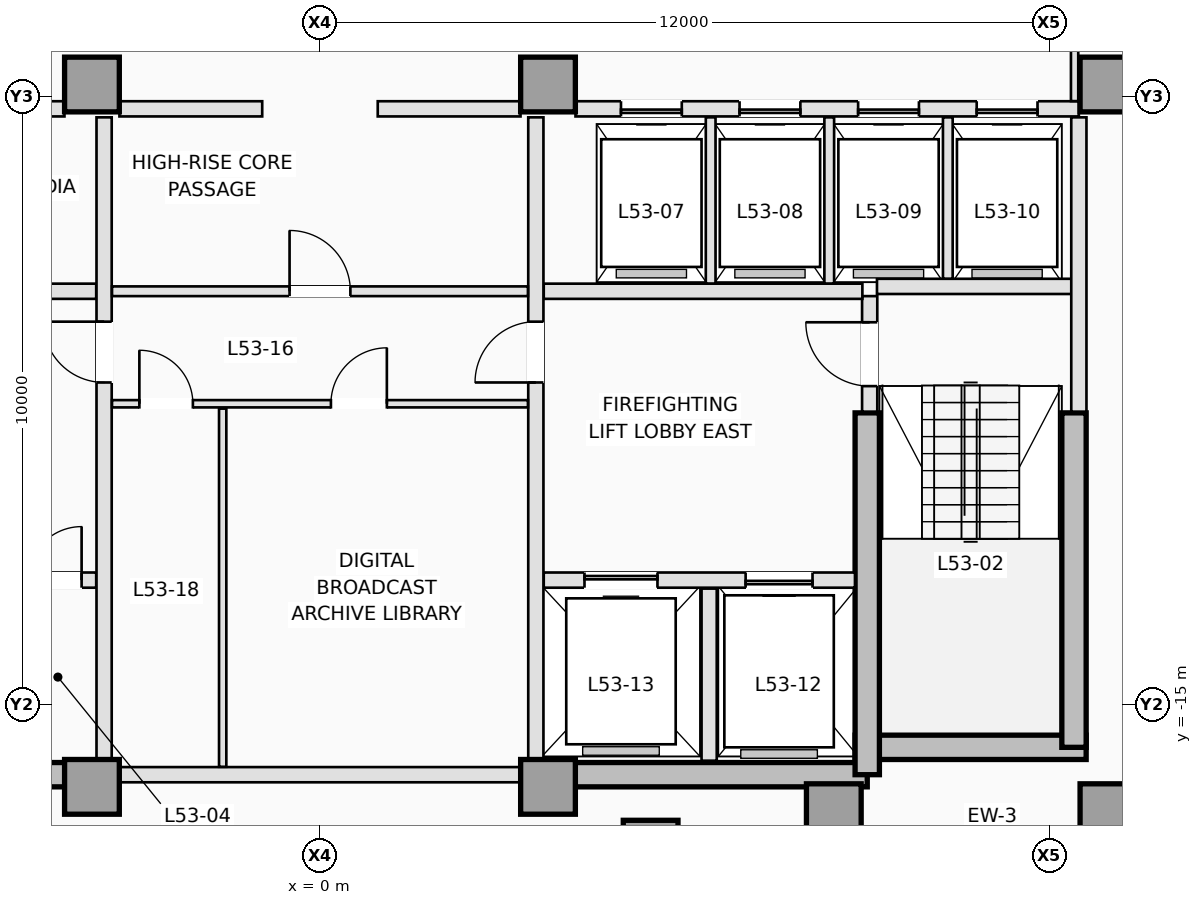
"""IFC4 building model, lengths in metres.
Left out: names, types, materials, properties, quantities, classifications, styles, units other than length and angle.
Written with IfcOpenShell. Run it as: python <this file> out.ifc"""

import sys

from ifc_helpers import new_model, si_unit, direction, frame, frame_2d, origin, origin_2d, place, context, subcontext, project, spatial, rectangle, extrude, element, fill, save


model = new_model("IFC4")
c1 = context("Model", 3, precision=1e-05, world=origin(), true_north=direction((0.0, 1.0)))
c2 = subcontext(c1, "Body", "Model", "MODEL_VIEW")
j1 = project(units=[si_unit("LENGTHUNIT", "METRE"), si_unit("PLANEANGLEUNIT", "RADIAN")], contexts=[c1])
p1 = place(None, origin())
s1 = spatial("IfcSite", under=j1, at=p1, CompositionType="ELEMENT")
p2 = place(p1, origin())
s2 = spatial("IfcBuilding", under=s1, at=p2, CompositionType="ELEMENT")
p3 = place(p2, frame((0.0, 0.0, 193.9)))
s3 = spatial("IfcBuildingStorey", under=s2, at=p3, CompositionType="ELEMENT", Elevation=193.9)
for number, where, z_axis, x_axis in (
    (1, (-9.0, -16.15, 0.0), (0.0, 0.0, 1.0), (1.0, 0.0, 0.0)),
    (2, (3.75, -16.15, 0.0), (0.0, 0.0, 1.0), (1.0, 0.0, 0.0)),
):
    element("IfcWall", number, at=place(p3, frame(where, z_axis=z_axis, x_axis=x_axis)), inside=s3, PredefinedType="SHEAR", context=c2, shape_type="SweptSolid", body=[
        extrude(rectangle(XDim=5.25, YDim=0.4, at=frame_2d((2.625, 0.0))), origin(), (0.0, 0.0, 1.0), 3.5),
    ])
p4 = place(p3, frame((8.8, -15.7, 0.0), z_axis=(0.0, 0.0, 1.0), x_axis=(1.0, 0.0, 0.0)))
e3 = element("IfcWall", 3, at=p4, inside=s3, PredefinedType="SHEAR", context=c2, shape_type="SweptSolid", body=[
    extrude(rectangle(XDim=3.8, YDim=0.4, at=frame_2d((1.9, 0.0))), origin(), (0.0, 0.0, 1.0), 3.5),
])
p5 = place(p3, frame((12.4, -15.7, 0.0), z_axis=(0.0, 0.0, 1.0), x_axis=(0.0, 1.0, 0.0)))
e4 = element("IfcWall", 4, at=p5, inside=s3, PredefinedType="SHEAR", context=c2, shape_type="SweptSolid", body=[
    extrude(rectangle(XDim=5.5, YDim=0.4, at=frame_2d((2.75, 0.0))), origin(), (0.0, 0.0, 1.0), 3.5),
])
p6 = place(p3, frame((9.0, -16.15, 0.0), z_axis=(0.0, 0.0, 1.0), x_axis=(0.0, 1.0, 0.0)))
e5 = element("IfcWall", 5, at=p6, inside=s3, PredefinedType="SHEAR", context=c2, shape_type="SweptSolid", body=[
    extrude(rectangle(XDim=5.95, YDim=0.4, at=frame_2d((2.975, 0.0))), origin(), (0.0, 0.0, 1.0), 3.5),
])
for number, where, z_axis, x_axis in (
    (6, (-3.75, -16.35, 0.0), (0.0, 0.0, 1.0), (1.0, 0.0, 0.0)),
    (7, (3.75, -16.35, 0.0), (0.0, 0.0, 1.0), (1.0, 0.0, 0.0)),
    (8, (8.45, -16.75, 0.0), (0.0, 0.0, 1.0), (1.0, 0.0, 0.0)),
    (9, (12.95, -16.75, 0.0), (0.0, 0.0, 1.0), (1.0, 0.0, 0.0)),
    (10, (-3.75, -4.8, 0.0), (0.0, 0.0, 1.0), (1.0, 0.0, 0.0)),
    (11, (3.75, -4.8, 0.0), (0.0, 0.0, 1.0), (1.0, 0.0, 0.0)),
    (12, (12.95, -4.8, 0.0), (0.0, 0.0, 1.0), (1.0, 0.0, 0.0)),
    (13, (5.438, -17.35, 0.0), (0.0, 0.0, 1.0), (0.0, 1.0, 0.0)),
):
    element("IfcColumn", number, at=place(p3, frame(where, z_axis=z_axis, x_axis=x_axis)), inside=s3, PredefinedType="COLUMN", context=c2, shape_type="SweptSolid", body=[
        extrude(rectangle(XDim=0.9, YDim=0.9, at=origin_2d()), origin(), (0.0, 0.0, 1.0), 3.5),
    ])
p7 = place(p3, frame((9.04, -10.18, 0.0), z_axis=(0.0, 0.0, 1.0), x_axis=(0.0, 1.0, 0.0)))
e14 = element("IfcWall", 14, at=p7, inside=s3, PredefinedType="PARTITIONING", context=c2, shape_type="SweptSolid", body=[
    extrude(rectangle(XDim=1.9, YDim=0.25, at=frame_2d((0.95, 0.0))), origin(), (0.0, 0.0, 1.0), 3.25),
])
p8 = place(p7, frame((0.42, 0.0, 0.0)))
e15 = element("IfcOpeningElement", 15, at=p8, cuts=e14, PredefinedType="OPENING", context=c2, shape_type="SweptSolid", body=[
    extrude(rectangle(XDim=1.05, YDim=2.15, at=frame_2d((0.525, 1.075))), frame((0.0, 0.135, 0.0), z_axis=(0.0, -1.0, 0.0), x_axis=(1.0, 0.0, 0.0)), (0.0, 0.0, 1.0), 0.27),
])
p9 = place(p3, frame((9.16, -8.12, 0.0), z_axis=(0.0, 0.0, 1.0), x_axis=(1.0, 0.0, 0.0)))
e16 = element("IfcWall", 16, at=p9, inside=s3, PredefinedType="PARTITIONING", context=c2, shape_type="SweptSolid", body=[
    extrude(rectangle(XDim=3.22, YDim=0.25, at=frame_2d((1.61, 0.0))), origin(), (0.0, 0.0, 1.0), 3.25),
])
p10 = place(p3, frame((12.48, -10.18, 0.0), z_axis=(0.0, 0.0, 1.0), x_axis=(0.0, 1.0, 0.0)))
e17 = element("IfcWall", 17, at=p10, inside=s3, PredefinedType="PARTITIONING", context=c2, shape_type="SweptSolid", body=[
    extrude(rectangle(XDim=4.84, YDim=0.25, at=frame_2d((2.42, 0.0))), origin(), (0.0, 0.0, 1.0), 3.25),
])
p11 = place(p3, frame((-8.798, -12.95, 0.0), z_axis=(0.0, 0.0, 1.0), x_axis=(1.0, 0.0, 0.0)))
e18 = element("IfcWall", 18, at=p11, inside=s3, PredefinedType="PARTITIONING", context=c2, shape_type="SweptSolid", body=[
    extrude(rectangle(XDim=5.118, YDim=0.25, at=frame_2d((2.559, 0.0))), origin(), (0.0, 0.0, 1.0), 3.25),
])
p12 = place(p11, frame((0.698, 0.0, 0.0)))
e19 = element("IfcOpeningElement", 19, at=p12, cuts=e18, PredefinedType="OPENING", context=c2, shape_type="SweptSolid", body=[
    extrude(rectangle(XDim=1.1, YDim=2.15, at=frame_2d((0.55, 1.075))), frame((0.0, 0.135, 0.0), z_axis=(0.0, -1.0, 0.0), x_axis=(1.0, 0.0, 0.0)), (0.0, 0.0, 1.0), 0.27),
])
p13 = place(p11, frame((2.598, 0.0, 0.0)))
e20 = element("IfcOpeningElement", 20, at=p13, cuts=e18, PredefinedType="OPENING", context=c2, shape_type="SweptSolid", body=[
    extrude(rectangle(XDim=0.88, YDim=2.1, at=frame_2d((0.44, 1.05))), frame((0.0, 0.135, 0.0), z_axis=(0.0, -1.0, 0.0), x_axis=(1.0, 0.0, 0.0)), (0.0, 0.0, 1.0), 0.27),
])
p14 = place(p11, frame((3.998, 0.0, 0.0)))
e21 = element("IfcOpeningElement", 21, at=p14, cuts=e18, PredefinedType="OPENING", context=c2, shape_type="SweptSolid", body=[
    extrude(rectangle(XDim=0.88, YDim=2.1, at=frame_2d((0.44, 1.05))), frame((0.0, 0.135, 0.0), z_axis=(0.0, -1.0, 0.0), x_axis=(1.0, 0.0, 0.0)), (0.0, 0.0, 1.0), 0.27),
])
p15 = place(p3, frame((3.68, -12.95, 0.0), z_axis=(0.0, 0.0, 1.0), x_axis=(1.0, 0.0, 0.0)))
e22 = element("IfcWall", 22, at=p15, inside=s3, PredefinedType="PARTITIONING", context=c2, shape_type="SweptSolid", body=[
    extrude(rectangle(XDim=5.118, YDim=0.25, at=frame_2d((2.559, 0.0))), origin(), (0.0, 0.0, 1.0), 3.25),
])
p16 = place(p15, frame((3.32, 0.0, 0.0)))
e23 = element("IfcOpeningElement", 23, at=p16, cuts=e22, PredefinedType="OPENING", context=c2, shape_type="SweptSolid", body=[
    extrude(rectangle(XDim=1.1, YDim=2.15, at=frame_2d((0.55, 1.075))), frame((0.0, 0.135, 0.0), z_axis=(0.0, -1.0, 0.0), x_axis=(1.0, 0.0, 0.0)), (0.0, 0.0, 1.0), 0.27),
])
p17 = place(p15, frame((0.67, 0.0, 0.0)))
e24 = element("IfcOpeningElement", 24, at=p17, cuts=e22, PredefinedType="OPENING", context=c2, shape_type="SweptSolid", body=[
    extrude(rectangle(XDim=1.2, YDim=2.15, at=frame_2d((0.6, 1.075))), frame((0.0, 0.135, 0.0), z_axis=(0.0, -1.0, 0.0), x_axis=(1.0, 0.0, 0.0)), (0.0, 0.0, 1.0), 0.27),
])
p18 = place(p3, frame((6.4, -15.92, 0.0), z_axis=(0.0, 0.0, 1.0), x_axis=(0.0, 1.0, 0.0)))
e25 = element("IfcWall", 25, at=p18, inside=s3, PredefinedType="PARTITIONING", context=c2, shape_type="SweptSolid", body=[
    extrude(rectangle(XDim=2.83, YDim=0.25, at=frame_2d((1.415, 0.0))), origin(), (0.0, 0.0, 1.0), 3.25),
])
for number, where, z_axis, x_axis in (
    (26, (-8.92, -8.2, 0.0), (0.0, 0.0, 1.0), (1.0, 0.0, 0.0)),
    (27, (3.68, -8.2, 0.0), (0.0, 0.0, 1.0), (1.0, 0.0, 0.0)),
):
    element("IfcWall", number, at=place(p3, frame(where, z_axis=z_axis, x_axis=x_axis)), inside=s3, PredefinedType="PARTITIONING", context=c2, shape_type="SweptSolid", body=[
        extrude(rectangle(XDim=5.24, YDim=0.25, at=frame_2d((2.62, 0.0))), origin(), (0.0, 0.0, 1.0), 3.25),
    ])
p19 = place(p3, frame((-3.55, -15.898, 0.0), z_axis=(0.0, 0.0, 1.0), x_axis=(0.0, 1.0, 0.0)))
e28 = element("IfcWall", 28, at=p19, inside=s3, PredefinedType="PARTITIONING", context=c2, shape_type="SweptSolid", body=[
    extrude(rectangle(XDim=10.558, YDim=0.25, at=frame_2d((5.279, 0.0))), origin(), (0.0, 0.0, 1.0), 3.25),
])
p20 = place(p19, frame((6.198, 0.0, 0.0)))
e29 = element("IfcOpeningElement", 29, at=p20, cuts=e28, PredefinedType="OPENING", context=c2, shape_type="SweptSolid", body=[
    extrude(rectangle(XDim=1.0, YDim=2.15, at=frame_2d((0.5, 1.075))), frame((0.0, 0.135, 0.0), z_axis=(0.0, -1.0, 0.0), x_axis=(1.0, 0.0, 0.0)), (0.0, 0.0, 1.0), 0.27),
])
p21 = place(p3, frame((3.55, -15.898, 0.0), z_axis=(0.0, 0.0, 1.0), x_axis=(0.0, 1.0, 0.0)))
e30 = element("IfcWall", 30, at=p21, inside=s3, PredefinedType="PARTITIONING", context=c2, shape_type="SweptSolid", body=[
    extrude(rectangle(XDim=10.558, YDim=0.25, at=frame_2d((5.279, 0.0))), origin(), (0.0, 0.0, 1.0), 3.25),
])
p22 = place(p21, frame((6.198, 0.0, 0.0)))
e31 = element("IfcOpeningElement", 31, at=p22, cuts=e30, PredefinedType="OPENING", context=c2, shape_type="SweptSolid", body=[
    extrude(rectangle(XDim=1.0, YDim=2.15, at=frame_2d((0.5, 1.075))), frame((0.0, 0.135, 0.0), z_axis=(0.0, -1.0, 0.0), x_axis=(1.0, 0.0, 0.0)), (0.0, 0.0, 1.0), 0.27),
])
p23 = place(p3, frame((-12.48, -5.2, 0.0), z_axis=(0.0, 0.0, 1.0), x_axis=(1.0, 0.0, 0.0)))
e32 = element("IfcWall", 32, at=p23, inside=s3, PredefinedType="PARTITIONING", context=c2, shape_type="SweptSolid", body=[
    extrude(rectangle(XDim=8.278, YDim=0.25, at=frame_2d((4.139, 0.0))), origin(), (0.0, 0.0, 1.0), 3.25),
])
p24 = place(p23, frame((3.05, 0.0, 0.0)))
e33 = element("IfcOpeningElement", 33, at=p24, cuts=e32, PredefinedType="OPENING", context=c2, shape_type="SweptSolid", body=[
    extrude(rectangle(XDim=0.92, YDim=2.12, at=frame_2d((0.46, 1.06))), frame((0.0, 0.135, 0.0), z_axis=(0.0, -1.0, 0.0), x_axis=(1.0, 0.0, 0.0)), (0.0, 0.0, 1.0), 0.27),
])
p25 = place(p23, frame((6.15, 0.0, 0.0)))
e34 = element("IfcOpeningElement", 34, at=p25, cuts=e32, PredefinedType="OPENING", context=c2, shape_type="SweptSolid", body=[
    extrude(rectangle(XDim=0.92, YDim=2.12, at=frame_2d((0.46, 1.06))), frame((0.0, 0.135, 0.0), z_axis=(0.0, -1.0, 0.0), x_axis=(1.0, 0.0, 0.0)), (0.0, 0.0, 1.0), 0.27),
])
p26 = place(p3, frame((4.202, -5.2, 0.0), z_axis=(0.0, 0.0, 1.0), x_axis=(1.0, 0.0, 0.0)))
e35 = element("IfcWall", 35, at=p26, inside=s3, PredefinedType="PARTITIONING", context=c2, shape_type="SweptSolid", body=[
    extrude(rectangle(XDim=8.278, YDim=0.25, at=frame_2d((4.139, 0.0))), origin(), (0.0, 0.0, 1.0), 3.25),
])
p27 = place(p26, frame((0.748, 0.0, 0.0)))
e36 = element("IfcOpeningElement", 36, at=p27, cuts=e35, PredefinedType="OPENING", context=c2, shape_type="SweptSolid", body=[
    extrude(rectangle(XDim=1.0, YDim=2.15, at=frame_2d((0.5, 1.075))), frame((0.0, 0.135, 0.0), z_axis=(0.0, -1.0, 0.0), x_axis=(1.0, 0.0, 0.0)), (0.0, 0.0, 1.0), 0.27),
])
p28 = place(p26, frame((2.698, 0.0, 0.0)))
e37 = element("IfcOpeningElement", 37, at=p28, cuts=e35, PredefinedType="OPENING", context=c2, shape_type="SweptSolid", body=[
    extrude(rectangle(XDim=1.0, YDim=2.15, at=frame_2d((0.5, 1.075))), frame((0.0, 0.135, 0.0), z_axis=(0.0, -1.0, 0.0), x_axis=(1.0, 0.0, 0.0)), (0.0, 0.0, 1.0), 0.27),
])
p29 = place(p26, frame((4.648, 0.0, 0.0)))
e38 = element("IfcOpeningElement", 38, at=p29, cuts=e35, PredefinedType="OPENING", context=c2, shape_type="SweptSolid", body=[
    extrude(rectangle(XDim=1.0, YDim=2.15, at=frame_2d((0.5, 1.075))), frame((0.0, 0.135, 0.0), z_axis=(0.0, -1.0, 0.0), x_axis=(1.0, 0.0, 0.0)), (0.0, 0.0, 1.0), 0.27),
])
p30 = place(p26, frame((6.598, 0.0, 0.0)))
e39 = element("IfcOpeningElement", 39, at=p30, cuts=e35, PredefinedType="OPENING", context=c2, shape_type="SweptSolid", body=[
    extrude(rectangle(XDim=1.0, YDim=2.15, at=frame_2d((0.5, 1.075))), frame((0.0, 0.135, 0.0), z_axis=(0.0, -1.0, 0.0), x_axis=(1.0, 0.0, 0.0)), (0.0, 0.0, 1.0), 0.27),
])
for number, where, z_axis, x_axis in (
    (40, (-3.298, -5.2, 0.0), (0.0, 0.0, 1.0), (1.0, 0.0, 0.0)),
    (41, (0.95, -5.2, 0.0), (0.0, 0.0, 1.0), (1.0, 0.0, 0.0)),
):
    element("IfcWall", number, at=place(p3, frame(where, z_axis=z_axis, x_axis=x_axis)), inside=s3, PredefinedType="PARTITIONING", context=c2, shape_type="SweptSolid", body=[
        extrude(rectangle(XDim=2.348, YDim=0.25, at=frame_2d((1.174, 0.0))), origin(), (0.0, 0.0, 1.0), 3.25),
    ])
for number, where, z_axis, x_axis in (
    (42, (6.425, -8.073, 0.0), (0.0, 0.0, 1.0), (0.0, 1.0, 0.0)),
    (43, (8.375, -8.073, 0.0), (0.0, 0.0, 1.0), (0.0, 1.0, 0.0)),
):
    element("IfcWall", number, at=place(p3, frame(where, z_axis=z_axis, x_axis=x_axis)), inside=s3, PredefinedType="PARTITIONING", context=c2, shape_type="SweptSolid", body=[
        extrude(rectangle(XDim=2.733, YDim=0.16, at=frame_2d((1.366, 0.0))), origin(), (0.0, 0.0, 1.0), 3.25),
    ])
p31 = place(p3, frame((10.325, -7.993, 0.0), z_axis=(0.0, 0.0, 1.0), x_axis=(0.0, 1.0, 0.0)))
e44 = element("IfcWall", 44, at=p31, inside=s3, PredefinedType="PARTITIONING", context=c2, shape_type="SweptSolid", body=[
    extrude(rectangle(XDim=2.653, YDim=0.16, at=frame_2d((1.326, 0.0))), origin(), (0.0, 0.0, 1.0), 3.25),
])
p32 = place(p3, frame((-3.298, -16.15, 0.0), z_axis=(0.0, 0.0, 1.0), x_axis=(1.0, 0.0, 0.0)))
e45 = element("IfcWall", 45, at=p32, inside=s3, PredefinedType="PARTITIONING", context=c2, shape_type="SweptSolid", body=[
    extrude(rectangle(XDim=6.596, YDim=0.25, at=frame_2d((3.298, 0.0))), origin(), (0.0, 0.0, 1.0), 2.45),
])
p33 = place(p3, frame((-3.42, -8.2, 0.0), z_axis=(0.0, 0.0, 1.0), x_axis=(1.0, 0.0, 0.0)))
e46 = element("IfcWall", 46, at=p33, inside=s3, PredefinedType="PARTITIONING", context=c2, shape_type="SweptSolid", body=[
    extrude(rectangle(XDim=6.84, YDim=0.16, at=frame_2d((3.42, 0.0))), origin(), (0.0, 0.0, 1.0), 3.25),
])
p34 = place(p33, frame((2.92, 0.0, 0.0)))
e47 = element("IfcOpeningElement", 47, at=p34, cuts=e46, PredefinedType="OPENING", context=c2, shape_type="SweptSolid", body=[
    extrude(rectangle(XDim=1.0, YDim=2.15, at=frame_2d((0.5, 1.075))), frame((0.0, 0.09, 0.0), z_axis=(0.0, -1.0, 0.0), x_axis=(1.0, 0.0, 0.0)), (0.0, 0.0, 1.0), 0.18),
])
p35 = place(p3, frame((-3.42, -10.05, 0.0), z_axis=(0.0, 0.0, 1.0), x_axis=(1.0, 0.0, 0.0)))
e48 = element("IfcWall", 48, at=p35, inside=s3, PredefinedType="PARTITIONING", context=c2, shape_type="SweptSolid", body=[
    extrude(rectangle(XDim=6.84, YDim=0.12, at=frame_2d((3.42, 0.0))), origin(), (0.0, 0.0, 1.0), 3.25),
])
p36 = place(p35, frame((0.45, 0.0, 0.0)))
e49 = element("IfcOpeningElement", 49, at=p36, cuts=e48, PredefinedType="OPENING", context=c2, shape_type="SweptSolid", body=[
    extrude(rectangle(XDim=0.88, YDim=2.12, at=frame_2d((0.44, 1.06))), frame((0.0, 0.07, 0.0), z_axis=(0.0, -1.0, 0.0), x_axis=(1.0, 0.0, 0.0)), (0.0, 0.0, 1.0), 0.14),
])
p37 = place(p35, frame((3.6, 0.0, 0.0)))
e50 = element("IfcOpeningElement", 50, at=p37, cuts=e48, PredefinedType="OPENING", context=c2, shape_type="SweptSolid", body=[
    extrude(rectangle(XDim=0.92, YDim=2.12, at=frame_2d((0.46, 1.06))), frame((0.0, 0.07, 0.0), z_axis=(0.0, -1.0, 0.0), x_axis=(1.0, 0.0, 0.0)), (0.0, 0.0, 1.0), 0.14),
])
p38 = place(p3, frame((-1.6, -16.02, 0.0), z_axis=(0.0, 0.0, 1.0), x_axis=(0.0, 1.0, 0.0)))
e51 = element("IfcWall", 51, at=p38, inside=s3, PredefinedType="PARTITIONING", context=c2, shape_type="SweptSolid", body=[
    extrude(rectangle(XDim=5.89, YDim=0.12, at=frame_2d((2.945, 0.0))), origin(), (0.0, 0.0, 1.0), 3.25),
])
p39 = place(p3, frame((12.41, -2.462, 0.0), z_axis=(0.0, 0.0, 1.0), x_axis=(0.0, -1.0, 0.0)))
e52 = element("IfcWall", 52, at=p39, inside=s3, PredefinedType="PARTITIONING", context=c2, shape_type="SweptSolid", body=[
    extrude(rectangle(XDim=2.611, YDim=0.12, at=frame_2d((1.306, 0.0))), origin(), (0.0, 0.0, 1.0), 3.25),
])
p40 = place(p27, origin())
e53 = element("IfcDoor", 53, at=p40, inside=s3, OperationType="SLIDING_TO_RIGHT", PredefinedType="DOOR", context=c2, shape_type="SweptSolid", body=[
    extrude(rectangle(XDim=1.0, YDim=2.15, at=frame_2d((0.5, 1.075))), frame((0.0, 0.025, 0.0), z_axis=(0.0, -1.0, 0.0), x_axis=(1.0, 0.0, 0.0)), (0.0, 0.0, 1.0), 0.05),
])
fill(e36, e53)
p41 = place(p28, origin())
e54 = element("IfcDoor", 54, at=p41, inside=s3, OperationType="SLIDING_TO_RIGHT", PredefinedType="DOOR", context=c2, shape_type="SweptSolid", body=[
    extrude(rectangle(XDim=1.0, YDim=2.15, at=frame_2d((0.5, 1.075))), frame((0.0, 0.025, 0.0), z_axis=(0.0, -1.0, 0.0), x_axis=(1.0, 0.0, 0.0)), (0.0, 0.0, 1.0), 0.05),
])
fill(e37, e54)
p42 = place(p29, origin())
e55 = element("IfcDoor", 55, at=p42, inside=s3, OperationType="SLIDING_TO_RIGHT", PredefinedType="DOOR", context=c2, shape_type="SweptSolid", body=[
    extrude(rectangle(XDim=1.0, YDim=2.15, at=frame_2d((0.5, 1.075))), frame((0.0, 0.025, 0.0), z_axis=(0.0, -1.0, 0.0), x_axis=(1.0, 0.0, 0.0)), (0.0, 0.0, 1.0), 0.05),
])
fill(e38, e55)
p43 = place(p30, origin())
e56 = element("IfcDoor", 56, at=p43, inside=s3, OperationType="SLIDING_TO_RIGHT", PredefinedType="DOOR", context=c2, shape_type="SweptSolid", body=[
    extrude(rectangle(XDim=1.0, YDim=2.15, at=frame_2d((0.5, 1.075))), frame((0.0, 0.025, 0.0), z_axis=(0.0, -1.0, 0.0), x_axis=(1.0, 0.0, 0.0)), (0.0, 0.0, 1.0), 0.05),
])
fill(e39, e56)
p44 = place(p16, origin())
e57 = element("IfcDoor", 57, at=p44, inside=s3, OperationType="SLIDING_TO_RIGHT", PredefinedType="DOOR", context=c2, shape_type="SweptSolid", body=[
    extrude(rectangle(XDim=1.1, YDim=2.15, at=frame_2d((0.55, 1.075))), frame((0.0, 0.025, 0.0), z_axis=(0.0, -1.0, 0.0), x_axis=(1.0, 0.0, 0.0)), (0.0, 0.0, 1.0), 0.05),
])
fill(e23, e57)
p45 = place(p17, origin())
e58 = element("IfcDoor", 58, at=p45, inside=s3, OperationType="SLIDING_TO_LEFT", PredefinedType="DOOR", context=c2, shape_type="SweptSolid", body=[
    extrude(rectangle(XDim=1.2, YDim=2.15, at=frame_2d((0.6, 1.075))), frame((0.0, 0.025, 0.0), z_axis=(0.0, -1.0, 0.0), x_axis=(1.0, 0.0, 0.0)), (0.0, 0.0, 1.0), 0.05),
])
fill(e24, e58)
p46 = place(p8, origin())
e59 = element("IfcDoor", 59, at=p46, inside=s3, OperationType="SINGLE_SWING_RIGHT", PredefinedType="DOOR", context=c2, shape_type="SweptSolid", body=[
    extrude(rectangle(XDim=1.05, YDim=2.15, at=frame_2d((0.525, 1.075))), frame((0.0, 0.025, 0.0), z_axis=(0.0, -1.0, 0.0), x_axis=(1.0, 0.0, 0.0)), (0.0, 0.0, 1.0), 0.05),
])
fill(e15, e59)
p47 = place(p14, origin())
e60 = element("IfcDoor", 60, at=p47, inside=s3, OperationType="SINGLE_SWING_RIGHT", PredefinedType="TRAPDOOR", context=c2, shape_type="SweptSolid", body=[
    extrude(rectangle(XDim=0.88, YDim=2.1, at=frame_2d((0.44, 1.05))), frame((0.0, 0.025, 0.0), z_axis=(0.0, -1.0, 0.0), x_axis=(1.0, 0.0, 0.0)), (0.0, 0.0, 1.0), 0.05),
])
fill(e21, e60)
p48 = place(p20, origin())
e61 = element("IfcDoor", 61, at=p48, inside=s3, OperationType="SINGLE_SWING_RIGHT", PredefinedType="DOOR", context=c2, shape_type="SweptSolid", body=[
    extrude(rectangle(XDim=1.0, YDim=2.15, at=frame_2d((0.5, 1.075))), frame((0.0, 0.025, 0.0), z_axis=(0.0, -1.0, 0.0), x_axis=(1.0, 0.0, 0.0)), (0.0, 0.0, 1.0), 0.05),
])
fill(e29, e61)
p49 = place(p22, origin())
e62 = element("IfcDoor", 62, at=p49, inside=s3, OperationType="SINGLE_SWING_LEFT", PredefinedType="DOOR", context=c2, shape_type="SweptSolid", body=[
    extrude(rectangle(XDim=1.0, YDim=2.15, at=frame_2d((0.5, 1.075))), frame((0.0, 0.025, 0.0), z_axis=(0.0, -1.0, 0.0), x_axis=(1.0, 0.0, 0.0)), (0.0, 0.0, 1.0), 0.05),
])
fill(e31, e62)
p50 = place(p34, origin())
e63 = element("IfcDoor", 63, at=p50, inside=s3, OperationType="SINGLE_SWING_LEFT", PredefinedType="DOOR", context=c2, shape_type="SweptSolid", body=[
    extrude(rectangle(XDim=1.0, YDim=2.15, at=frame_2d((0.5, 1.075))), frame((0.0, 0.025, 0.0), z_axis=(0.0, -1.0, 0.0), x_axis=(1.0, 0.0, 0.0)), (0.0, 0.0, 1.0), 0.05),
])
fill(e47, e63)
p51 = place(p36, origin())
e64 = element("IfcDoor", 64, at=p51, inside=s3, OperationType="SINGLE_SWING_LEFT", PredefinedType="DOOR", context=c2, shape_type="SweptSolid", body=[
    extrude(rectangle(XDim=0.88, YDim=2.12, at=frame_2d((0.44, 1.06))), frame((0.0, 0.025, 0.0), z_axis=(0.0, -1.0, 0.0), x_axis=(1.0, 0.0, 0.0)), (0.0, 0.0, 1.0), 0.05),
])
fill(e49, e64)
p52 = place(p37, origin())
e65 = element("IfcDoor", 65, at=p52, inside=s3, OperationType="SINGLE_SWING_RIGHT", PredefinedType="DOOR", context=c2, shape_type="SweptSolid", body=[
    extrude(rectangle(XDim=0.92, YDim=2.12, at=frame_2d((0.46, 1.06))), frame((0.0, 0.025, 0.0), z_axis=(0.0, -1.0, 0.0), x_axis=(1.0, 0.0, 0.0)), (0.0, 0.0, 1.0), 0.05),
])
fill(e50, e65)
save(model, sys.argv[1])
